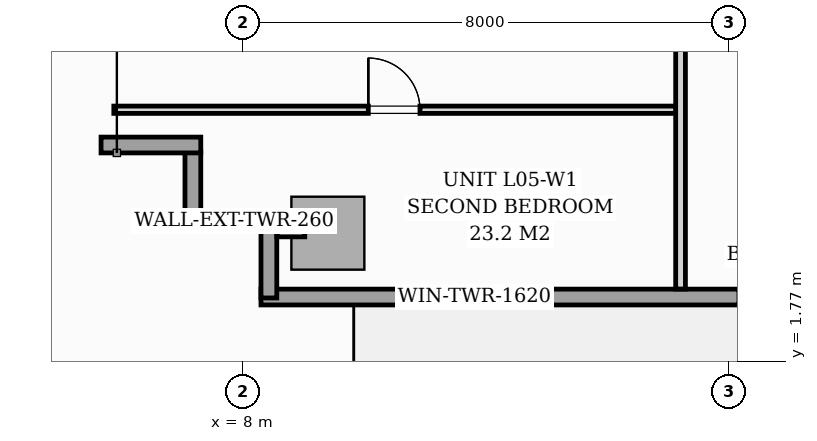
"""IFC4 building model, lengths in metres.
Left out: names, types, materials, properties, quantities, classifications, styles, units other than length and angle.
Written with IfcOpenShell. Run it as: python <this file> out.ifc"""

import sys

from ifc_helpers import new_model, si_unit, direction, frame, frame_2d, origin, origin_2d, place, context, subcontext, project, spatial, rectangle, extrude, source, transform, mapped, element, fill, save


model = new_model("IFC4")
c1 = context("Model", 3, precision=1e-05, world=origin(), true_north=direction((0.0, 1.0)))
c2 = subcontext(c1, "Body", "Model", "MODEL_VIEW")
j1 = project(units=[si_unit("LENGTHUNIT", "METRE"), si_unit("PLANEANGLEUNIT", "RADIAN")], contexts=[c1])
p1 = place(None, origin())
s1 = spatial("IfcSite", under=j1, at=p1, CompositionType="ELEMENT")
p2 = place(p1, origin())
s2 = spatial("IfcBuilding", under=s1, at=p2, CompositionType="ELEMENT")
p3 = place(p2, frame((0.0, 0.0, 23.0)))
s3 = spatial("IfcBuildingStorey", under=s2, at=p3, CompositionType="ELEMENT", Elevation=23.0)
m1 = source(origin(), c2, "Body", "SweptSolid", [
    extrude(rectangle(XDim=1.2, YDim=1.2, at=origin_2d()), origin(), (0.0, 0.0, 1.0), 3.194),
])
p4 = place(p3, frame((9.4, 3.88, 0.004), z_axis=(0.0, 0.0, 1.0), x_axis=(1.0, 0.0, 0.0)))
e1 = element("IfcColumn", 1, at=p4, inside=s3, PredefinedType="COLUMN", context=c2, shape_type="MappedRepresentation", body=[
    mapped(m1, transform((0.0, 0.0, 0.0), scale=1.0)),
])
p5 = place(p3, frame((8.798, 4.08, 0.0), z_axis=(0.0, 0.0, 1.0), x_axis=(-1.0, 0.0, 0.0)))
e2 = element("IfcWall", 2, at=p5, inside=s3, PredefinedType="STANDARD", context=c2, shape_type="SweptSolid", body=[
    extrude(rectangle(XDim=1.878, YDim=0.26, at=frame_2d((0.939, 0.0))), origin(), (0.0, 0.0, 1.0), 2.94),
])
p6 = place(p3, frame((7.18, 4.065, 0.0), z_axis=(0.0, 0.0, 1.0), x_axis=(0.0, 1.0, 0.0)))
e3 = element("IfcWall", 3, at=p6, inside=s3, PredefinedType="STANDARD", context=c2, shape_type="SweptSolid", body=[
    extrude(rectangle(XDim=1.15, YDim=0.26, at=frame_2d((0.575, 0.0))), origin(), (0.0, 0.0, 1.0), 2.94),
])
p7 = place(p3, frame((7.31, 5.33, 0.0), z_axis=(0.0, 0.0, 1.0), x_axis=(-1.0, 0.0, 0.0)))
e4 = element("IfcWall", 4, at=p7, inside=s3, PredefinedType="STANDARD", context=c2, shape_type="SweptSolid", body=[
    extrude(rectangle(XDim=1.64, YDim=0.26, at=frame_2d((0.82, 0.0))), origin(), (0.0, 0.0, 1.0), 2.94),
])
p8 = place(p3, frame((25.45, 2.83, 0.0), z_axis=(0.0, 0.0, 1.0), x_axis=(-1.0, 0.0, 0.0)))
e5 = element("IfcWall", 5, at=p8, inside=s3, PredefinedType="STANDARD", context=c2, shape_type="SweptSolid", body=[
    extrude(rectangle(XDim=17.15, YDim=0.26, at=frame_2d((8.575, 0.0))), origin(), (0.0, 0.0, 1.0), 2.94),
])
p9 = place(p8, frame((7.49, 0.0, 0.0)))
e6 = element("IfcOpeningElement", 6, at=p9, cuts=e5, PredefinedType="OPENING", context=c2, shape_type="SweptSolid", body=[
    extrude(rectangle(XDim=1.8, YDim=2.06, at=frame_2d((0.9, 1.03))), frame((0.0, 0.14, 0.0), z_axis=(0.0, -1.0, 0.0), x_axis=(1.0, 0.0, 0.0)), (0.0, 0.0, 1.0), 0.28),
])
p10 = place(p8, frame((0.7, 0.0, 0.65)))
e7 = element("IfcOpeningElement", 7, at=p10, cuts=e5, PredefinedType="OPENING", context=c2, shape_type="SweptSolid", body=[
    extrude(rectangle(XDim=1.6, YDim=1.5, at=frame_2d((0.8, 0.75))), frame((0.0, 0.14, 0.0), z_axis=(0.0, -1.0, 0.0), x_axis=(1.0, 0.0, 0.0)), (0.0, 0.0, 1.0), 0.28),
])
p11 = place(p8, frame((12.84, 0.0, 0.75)))
e8 = element("IfcOpeningElement", 8, at=p11, cuts=e5, PredefinedType="OPENING", context=c2, shape_type="SweptSolid", body=[
    extrude(rectangle(XDim=1.6, YDim=1.5, at=frame_2d((0.8, 0.75))), frame((0.0, 0.14, 0.0), z_axis=(0.0, -1.0, 0.0), x_axis=(1.0, 0.0, 0.0)), (0.0, 0.0, 1.0), 0.28),
])
p12 = place(p3, frame((8.43, 2.815, 0.0), z_axis=(0.0, 0.0, 1.0), x_axis=(0.0, 1.0, 0.0)))
e9 = element("IfcWall", 9, at=p12, inside=s3, PredefinedType="STANDARD", context=c2, shape_type="SweptSolid", body=[
    extrude(rectangle(XDim=1.15, YDim=0.26, at=frame_2d((0.575, 0.0))), origin(), (0.0, 0.0, 1.0), 2.94),
])
p13 = place(p3, frame((15.2, 2.962, 0.0), z_axis=(0.0, 0.0, 1.0), x_axis=(0.0, 1.0, 0.0)))
e10 = element("IfcWall", 10, at=p13, inside=s3, PredefinedType="PARTITIONING", context=c2, shape_type="SweptSolid", body=[
    extrude(rectangle(XDim=9.306, YDim=0.16, at=frame_2d((4.653, 0.0))), origin(), (0.0, 0.0, 1.0), 2.94),
])
p14 = place(p3, frame((5.88, 5.91, 0.0), z_axis=(0.0, 0.0, 1.0), x_axis=(1.0, 0.0, 0.0)))
e11 = element("IfcWall", 11, at=p14, inside=s3, PredefinedType="PARTITIONING", context=c2, shape_type="SweptSolid", body=[
    extrude(rectangle(XDim=9.238, YDim=0.12, at=frame_2d((4.619, 0.0))), origin(), (0.0, 0.0, 1.0), 2.94),
])
p15 = place(p14, frame((4.185, 0.0, 0.0)))
e12 = element("IfcOpeningElement", 12, at=p15, cuts=e11, PredefinedType="OPENING", context=c2, shape_type="SweptSolid", body=[
    extrude(rectangle(XDim=0.85, YDim=2.05, at=frame_2d((0.425, 1.025))), frame((0.0, 0.07, 0.0), z_axis=(0.0, -1.0, 0.0), x_axis=(1.0, 0.0, 0.0)), (0.0, 0.0, 1.0), 0.14),
])
p16 = place(p3, frame((9.02, 3.88, 0.0), z_axis=(0.0, 0.0, 1.0), x_axis=(-1.0, 0.0, 0.0)))
e13 = element("IfcWall", 13, at=p16, inside=s3, PredefinedType="PARTITIONING", context=c2, shape_type="SweptSolid", body=[
    extrude(rectangle(XDim=0.458, YDim=0.12, at=frame_2d((0.229, 0.0))), origin(), (0.0, 0.0, 1.0), 2.94),
])
m2 = source(origin(), c2, "Body", "SweptSolid", [
    extrude(rectangle(XDim=1.6, YDim=1.5, at=frame_2d((0.8, 0.75))), frame((0.0, 0.03, 0.0), z_axis=(0.0, -1.0, 0.0), x_axis=(1.0, 0.0, 0.0)), (0.0, 0.0, 1.0), 0.06),
])
p17 = place(p11, origin())
e14 = element("IfcWindow", 14, at=p17, inside=s3, PartitioningType="SINGLE_PANEL", PredefinedType="WINDOW", context=c2, shape_type="MappedRepresentation", body=[
    mapped(m2, transform((0.0, 0.0, 0.0), scale=1.0)),
])
fill(e8, e14)
m3 = source(origin(), c2, "Body", "SweptSolid", [
    extrude(rectangle(XDim=0.85, YDim=2.05, at=frame_2d((0.425, 1.025))), frame((0.0, 0.025, 0.0), z_axis=(0.0, -1.0, 0.0), x_axis=(1.0, 0.0, 0.0)), (0.0, 0.0, 1.0), 0.05),
])
p18 = place(p15, origin())
e15 = element("IfcDoor", 15, at=p18, inside=s3, OperationType="SINGLE_SWING_LEFT", PredefinedType="DOOR", context=c2, shape_type="MappedRepresentation", body=[
    mapped(m3, transform((0.0, 0.0, 0.0), scale=1.0)),
])
fill(e12, e15)
save(model, sys.argv[1])
